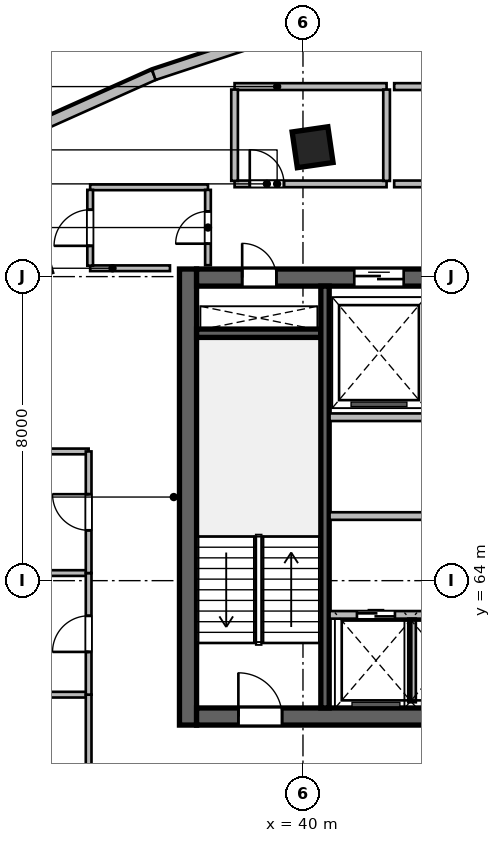
"""IFC4 building model, lengths in metres.
Left out: names, types, materials, properties, quantities, classifications, styles, units other than length and angle.
Written with IfcOpenShell. Run it as: python <this file> out.ifc"""

import sys

from ifc_helpers import new_model, si_unit, direction, frame, frame_2d, origin, origin_2d, place, context, subcontext, project, spatial, rectangle, extrude, source, transform, mapped, element, fill, save


model = new_model("IFC4")
c1 = context("Model", 3, precision=1e-05, world=origin(), true_north=direction((0.0, 1.0)))
c2 = subcontext(c1, "Body", "Model", "MODEL_VIEW")
j1 = project(units=[si_unit("LENGTHUNIT", "METRE"), si_unit("PLANEANGLEUNIT", "RADIAN")], contexts=[c1])
p1 = place(None, origin())
s1 = spatial("IfcSite", under=j1, at=p1, CompositionType="ELEMENT")
p2 = place(p1, origin())
s2 = spatial("IfcBuilding", under=s1, at=p2, CompositionType="ELEMENT")
p3 = place(p2, frame((0.0, 0.0, 243.0)))
s3 = spatial("IfcBuildingStorey", under=s2, at=p3, CompositionType="ELEMENT", Elevation=243.0)
m1 = source(origin(), c2, "Body", "SweptSolid", [
    extrude(rectangle(XDim=12.0, YDim=0.45, at=frame_2d((6.0, 0.0))), origin(), (0.0, 0.0, 1.0), 3.9),
])
p4 = place(p3, frame((36.975, 60.2, 0.0), z_axis=(0.0, 0.0, 1.0), x_axis=(0.0, 1.0, 0.0)))
e1 = element("IfcWall", 1, at=p4, inside=s3, PredefinedType="SHEAR", context=c2, shape_type="MappedRepresentation", body=[
    mapped(m1, transform((0.0, 0.0, 0.0), scale=1.0)),
])
m2 = source(origin(), c2, "Body", "SweptSolid", [
    extrude(rectangle(XDim=21.6, YDim=0.45, at=frame_2d((10.8, 0.0))), origin(), (0.0, 0.0, 1.0), 3.9),
])
p5 = place(p3, frame((37.2, 60.425, 0.0), z_axis=(0.0, 0.0, 1.0), x_axis=(1.0, 0.0, 0.0)))
e2 = element("IfcWall", 2, at=p5, inside=s3, PredefinedType="SHEAR", context=c2, shape_type="MappedRepresentation", body=[
    mapped(m2, transform((0.0, 0.0, 0.0), scale=1.0)),
])
p6 = place(p5, frame((1.1, 0.0, 0.0)))
e3 = element("IfcOpeningElement", 3, at=p6, cuts=e2, PredefinedType="OPENING", context=c2, shape_type="SweptSolid", body=[
    extrude(rectangle(XDim=1.15, YDim=2.15, at=frame_2d((0.575, 1.075))), frame((0.0, 0.235, 0.0), z_axis=(0.0, -1.0, 0.0), x_axis=(1.0, 0.0, 0.0)), (0.0, 0.0, 1.0), 0.47),
])
p7 = place(p5, frame((19.5, 0.0, 0.0)))
e4 = element("IfcOpeningElement", 4, at=p7, cuts=e2, PredefinedType="OPENING", context=c2, shape_type="SweptSolid", body=[
    extrude(rectangle(XDim=0.9, YDim=2.1, at=frame_2d((0.45, 1.05))), frame((0.0, 0.235, 0.0), z_axis=(0.0, -1.0, 0.0), x_axis=(1.0, 0.0, 0.0)), (0.0, 0.0, 1.0), 0.47),
])
p8 = place(p5, frame((12.02, 0.0, 0.0)))
e5 = element("IfcOpeningElement", 5, at=p8, cuts=e2, PredefinedType="OPENING", context=c2, shape_type="SweptSolid", body=[
    extrude(rectangle(XDim=1.6, YDim=2.15, at=frame_2d((0.8, 1.075))), frame((0.0, 0.235, 0.0), z_axis=(0.0, -1.0, 0.0), x_axis=(1.0, 0.0, 0.0)), (0.0, 0.0, 1.0), 0.47),
])
p9 = place(p3, frame((37.2, 71.975, 0.0), z_axis=(0.0, 0.0, 1.0), x_axis=(1.0, 0.0, 0.0)))
e6 = element("IfcWall", 6, at=p9, inside=s3, PredefinedType="SHEAR", context=c2, shape_type="MappedRepresentation", body=[
    mapped(m2, transform((0.0, 0.0, 0.0), scale=1.0)),
])
p10 = place(p9, frame((1.2, 0.0, 0.0)))
e7 = element("IfcOpeningElement", 7, at=p10, cuts=e6, PredefinedType="OPENING", context=c2, shape_type="SweptSolid", body=[
    extrude(rectangle(XDim=0.9, YDim=2.1, at=frame_2d((0.45, 1.05))), frame((0.0, 0.235, 0.0), z_axis=(0.0, -1.0, 0.0), x_axis=(1.0, 0.0, 0.0)), (0.0, 0.0, 1.0), 0.47),
])
p11 = place(p9, frame((14.7, 0.0, 0.0)))
e8 = element("IfcOpeningElement", 8, at=p11, cuts=e6, PredefinedType="OPENING", context=c2, shape_type="SweptSolid", body=[
    extrude(rectangle(XDim=1.2, YDim=2.15, at=frame_2d((0.6, 1.075))), frame((0.0, 0.235, 0.0), z_axis=(0.0, -1.0, 0.0), x_axis=(1.0, 0.0, 0.0)), (0.0, 0.0, 1.0), 0.47),
])
p12 = place(p9, frame((4.15, 0.0, 0.0)))
e9 = element("IfcOpeningElement", 9, at=p12, cuts=e6, PredefinedType="OPENING", context=c2, shape_type="SweptSolid", body=[
    extrude(rectangle(XDim=1.3, YDim=2.15, at=frame_2d((0.65, 1.075))), frame((0.0, 0.235, 0.0), z_axis=(0.0, -1.0, 0.0), x_axis=(1.0, 0.0, 0.0)), (0.0, 0.0, 1.0), 0.47),
])
p13 = place(p9, frame((6.76, 0.0, 0.0)))
e10 = element("IfcOpeningElement", 10, at=p13, cuts=e6, PredefinedType="OPENING", context=c2, shape_type="SweptSolid", body=[
    extrude(rectangle(XDim=0.85, YDim=2.1, at=frame_2d((0.425, 1.05))), frame((0.0, 0.235, 0.0), z_axis=(0.0, -1.0, 0.0), x_axis=(1.0, 0.0, 0.0)), (0.0, 0.0, 1.0), 0.47),
])
p14 = place(p9, frame((8.76, 0.0, 0.0)))
e11 = element("IfcOpeningElement", 11, at=p14, cuts=e6, PredefinedType="OPENING", context=c2, shape_type="SweptSolid", body=[
    extrude(rectangle(XDim=0.85, YDim=2.1, at=frame_2d((0.425, 1.05))), frame((0.0, 0.235, 0.0), z_axis=(0.0, -1.0, 0.0), x_axis=(1.0, 0.0, 0.0)), (0.0, 0.0, 1.0), 0.47),
])
p15 = place(p9, frame((10.725, 0.0, 0.0)))
e12 = element("IfcOpeningElement", 12, at=p15, cuts=e6, PredefinedType="OPENING", context=c2, shape_type="SweptSolid", body=[
    extrude(rectangle(XDim=0.85, YDim=2.1, at=frame_2d((0.425, 1.05))), frame((0.0, 0.235, 0.0), z_axis=(0.0, -1.0, 0.0), x_axis=(1.0, 0.0, 0.0)), (0.0, 0.0, 1.0), 0.47),
])
m3 = source(origin(), c2, "Body", "SweptSolid", [
    extrude(rectangle(XDim=3.27, YDim=0.22, at=frame_2d((1.635, 0.0))), origin(), (0.0, 0.0, 1.0), 3.9),
])
p16 = place(p3, frame((37.2, 70.51, 0.0), z_axis=(0.0, 0.0, 1.0), x_axis=(1.0, 0.0, 0.0)))
e13 = element("IfcWall", 13, at=p16, inside=s3, PredefinedType="SHEAR", context=c2, shape_type="MappedRepresentation", body=[
    mapped(m3, transform((0.0, 0.0, 0.0), scale=1.0)),
])
m4 = source(origin(), c2, "Body", "SweptSolid", [
    extrude(rectangle(XDim=11.1, YDim=0.22, at=frame_2d((5.55, 0.0))), origin(), (0.0, 0.0, 1.0), 3.9),
])
p17 = place(p3, frame((40.58, 60.65, 0.0), z_axis=(0.0, 0.0, 1.0), x_axis=(0.0, 1.0, 0.0)))
e14 = element("IfcWall", 14, at=p17, inside=s3, PredefinedType="SHEAR", context=c2, shape_type="MappedRepresentation", body=[
    mapped(m4, transform((0.0, 0.0, 0.0), scale=1.0)),
])
m5 = source(origin(), c2, "Body", "SweptSolid", [
    extrude(rectangle(XDim=0.95, YDim=0.95, at=origin_2d()), origin(), (0.0, 0.0, 1.0), 3.9),
])
p18 = place(p3, frame((40.253, 75.404, 0.0), z_axis=(0.0, 0.0, 1.0), x_axis=(-0.143492621991, 0.98965138682, 0.0)))
e15 = element("IfcColumn", 15, at=p18, inside=s3, PredefinedType="COLUMN", context=c2, shape_type="MappedRepresentation", body=[
    mapped(m5, transform((0.0, 0.0, 0.0), scale=1.0)),
])
m6 = source(origin(), c2, "Body", "SweptSolid", [
    extrude(rectangle(XDim=3.616, YDim=0.28, at=frame_2d((1.808, 0.0))), origin(), (0.0, 0.0, 1.0), 3.65),
])
p19 = place(p3, frame((32.777, 75.829, 0.0), z_axis=(0.0, 0.0, 1.0), x_axis=(0.912719530576, 0.408586659726, 0.0)))
e16 = element("IfcWall", 16, at=p19, inside=s3, PredefinedType="SOLIDWALL", context=c2, shape_type="MappedRepresentation", body=[
    mapped(m6, transform((0.0, 0.0, 0.0), scale=1.0)),
])
m7 = source(origin(), c2, "Body", "SweptSolid", [
    extrude(rectangle(XDim=3.557, YDim=0.28, at=frame_2d((1.778, 0.0))), origin(), (0.0, 0.0, 1.0), 3.65),
])
p20 = place(p3, frame((36.077, 77.307, 0.0), z_axis=(0.0, 0.0, 1.0), x_axis=(0.949687460385, 0.31319918197, 0.0)))
e17 = element("IfcWall", 17, at=p20, inside=s3, PredefinedType="SOLIDWALL", context=c2, shape_type="MappedRepresentation", body=[
    mapped(m7, transform((0.0, 0.0, 0.0), scale=1.0)),
])
m8 = source(origin(), c2, "Body", "SweptSolid", [
    extrude(rectangle(XDim=8.8, YDim=0.2, at=frame_2d((4.4, 0.0))), origin(), (0.0, 0.0, 1.0), 3.65),
])
p21 = place(p3, frame((40.7, 68.3, 0.0), z_axis=(0.0, 0.0, 1.0), x_axis=(1.0, 0.0, 0.0)))
e18 = element("IfcWall", 18, at=p21, inside=s3, PredefinedType="SOLIDWALL", context=c2, shape_type="MappedRepresentation", body=[
    mapped(m8, transform((0.0, 0.0, 0.0), scale=1.0)),
])
m9 = source(origin(), c2, "Body", "SweptSolid", [
    extrude(rectangle(XDim=8.02, YDim=0.2, at=frame_2d((4.01, 0.0))), origin(), (0.0, 0.0, 1.0), 3.65),
])
p22 = place(p3, frame((40.7, 63.1, 0.0), z_axis=(0.0, 0.0, 1.0), x_axis=(1.0, 0.0, 0.0)))
e19 = element("IfcWall", 19, at=p22, inside=s3, PredefinedType="SOLIDWALL", context=c2, shape_type="MappedRepresentation", body=[
    mapped(m9, transform((0.0, 0.0, 0.0), scale=1.0)),
])
p23 = place(p22, frame((0.72, 0.0, 0.0)))
e20 = element("IfcOpeningElement", 20, at=p23, cuts=e19, PredefinedType="OPENING", context=c2, shape_type="SweptSolid", body=[
    extrude(rectangle(XDim=1.0, YDim=2.15, at=frame_2d((0.5, 1.075))), frame((0.0, 0.11, 0.0), z_axis=(0.0, -1.0, 0.0), x_axis=(1.0, 0.0, 0.0)), (0.0, 0.0, 1.0), 0.22),
])
p24 = place(p22, frame((2.62, 0.0, 0.0)))
e21 = element("IfcOpeningElement", 21, at=p24, cuts=e19, PredefinedType="OPENING", context=c2, shape_type="SweptSolid", body=[
    extrude(rectangle(XDim=1.0, YDim=2.15, at=frame_2d((0.5, 1.075))), frame((0.0, 0.11, 0.0), z_axis=(0.0, -1.0, 0.0), x_axis=(1.0, 0.0, 0.0)), (0.0, 0.0, 1.0), 0.22),
])
p25 = place(p22, frame((4.55, 0.0, 0.0)))
e22 = element("IfcOpeningElement", 22, at=p25, cuts=e19, PredefinedType="OPENING", context=c2, shape_type="SweptSolid", body=[
    extrude(rectangle(XDim=1.0, YDim=2.15, at=frame_2d((0.5, 1.075))), frame((0.0, 0.11, 0.0), z_axis=(0.0, -1.0, 0.0), x_axis=(1.0, 0.0, 0.0)), (0.0, 0.0, 1.0), 0.22),
])
p26 = place(p22, frame((6.55, 0.0, 0.0)))
e23 = element("IfcOpeningElement", 23, at=p26, cuts=e19, PredefinedType="OPENING", context=c2, shape_type="SweptSolid", body=[
    extrude(rectangle(XDim=1.0, YDim=2.15, at=frame_2d((0.5, 1.075))), frame((0.0, 0.11, 0.0), z_axis=(0.0, -1.0, 0.0), x_axis=(1.0, 0.0, 0.0)), (0.0, 0.0, 1.0), 0.22),
])
m10 = source(origin(), c2, "Body", "SweptSolid", [
    extrude(rectangle(XDim=2.2, YDim=0.2, at=frame_2d((1.1, 0.0))), origin(), (0.0, 0.0, 1.0), 3.65),
])
p27 = place(p3, frame((42.87, 60.8, 0.0), z_axis=(0.0, 0.0, 1.0), x_axis=(0.0, 1.0, 0.0)))
e24 = element("IfcWall", 24, at=p27, inside=s3, PredefinedType="SOLIDWALL", context=c2, shape_type="MappedRepresentation", body=[
    mapped(m10, transform((0.0, 0.0, 0.0), scale=1.0)),
])
p28 = place(p3, frame((40.7, 65.7, 0.0), z_axis=(0.0, 0.0, 1.0), x_axis=(1.0, 0.0, 0.0)))
e25 = element("IfcWall", 25, at=p28, inside=s3, PredefinedType="SOLIDWALL", context=c2, shape_type="MappedRepresentation", body=[
    mapped(m8, transform((0.0, 0.0, 0.0), scale=1.0)),
])
p29 = place(p28, frame((3.8, 0.0, 0.0)))
e26 = element("IfcOpeningElement", 26, at=p29, cuts=e25, PredefinedType="OPENING", context=c2, shape_type="SweptSolid", body=[
    extrude(rectangle(XDim=0.95, YDim=2.15, at=frame_2d((0.475, 1.075))), frame((0.0, 0.11, 0.0), z_axis=(0.0, -1.0, 0.0), x_axis=(1.0, 0.0, 0.0)), (0.0, 0.0, 1.0), 0.22),
])
m11 = source(origin(), c2, "Body", "SweptSolid", [
    extrude(rectangle(XDim=2.1, YDim=0.15, at=frame_2d((1.05, 0.0))), origin(), (0.0, 0.0, 1.0), 3.65),
])
p30 = place(p3, frame((34.4, 72.22, 0.0), z_axis=(0.0, 0.0, 1.0), x_axis=(1.0, 0.0, 0.0)))
e27 = element("IfcWall", 27, at=p30, inside=s3, PredefinedType="PARTITIONING", context=c2, shape_type="MappedRepresentation", body=[
    mapped(m11, transform((0.0, 0.0, 0.0), scale=1.0)),
])
m12 = source(origin(), c2, "Body", "SweptSolid", [
    extrude(rectangle(XDim=3.1, YDim=0.15, at=frame_2d((1.55, 0.0))), origin(), (0.0, 0.0, 1.0), 3.081),
])
p31 = place(p3, frame((34.4, 74.35, 0.0), z_axis=(0.0, 0.0, 1.0), x_axis=(1.0, 0.0, 0.0)))
e28 = element("IfcWall", 28, at=p31, inside=s3, PredefinedType="PARTITIONING", context=c2, shape_type="MappedRepresentation", body=[
    mapped(m12, transform((0.0, 0.0, 0.0), scale=1.0)),
])
m13 = source(origin(), c2, "Body", "SweptSolid", [
    extrude(rectangle(XDim=1.995, YDim=0.15, at=frame_2d((0.998, 0.0))), origin(), (0.0, 0.0, 1.0), 3.65),
])
p32 = place(p3, frame((34.4, 72.288, 0.0), z_axis=(0.0, 0.0, 1.0), x_axis=(0.0, 1.0, 0.0)))
e29 = element("IfcWall", 29, at=p32, inside=s3, PredefinedType="PARTITIONING", context=c2, shape_type="MappedRepresentation", body=[
    mapped(m13, transform((0.0, 0.0, 0.0), scale=1.0)),
])
p33 = place(p32, frame((0.522, 0.0, 0.0)))
e30 = element("IfcOpeningElement", 30, at=p33, cuts=e29, PredefinedType="OPENING", context=c2, shape_type="SweptSolid", body=[
    extrude(rectangle(XDim=0.95, YDim=2.1, at=frame_2d((0.475, 1.05))), frame((0.0, 0.085, 0.0), z_axis=(0.0, -1.0, 0.0), x_axis=(1.0, 0.0, 0.0)), (0.0, 0.0, 1.0), 0.17),
])
m14 = source(origin(), c2, "Body", "SweptSolid", [
    extrude(rectangle(XDim=1.982, YDim=0.15, at=frame_2d((0.991, 0.0))), origin(), (0.0, 0.0, 1.0), 3.65),
])
p34 = place(p3, frame((37.5, 72.3, 0.0), z_axis=(0.0, 0.0, 1.0), x_axis=(0.0, 1.0, 0.0)))
e31 = element("IfcWall", 31, at=p34, inside=s3, PredefinedType="PARTITIONING", context=c2, shape_type="MappedRepresentation", body=[
    mapped(m14, transform((0.0, 0.0, 0.0), scale=1.0)),
])
p35 = place(p34, frame((0.566, 0.0, 0.0)))
e32 = element("IfcOpeningElement", 32, at=p35, cuts=e31, PredefinedType="OPENING", context=c2, shape_type="SweptSolid", body=[
    extrude(rectangle(XDim=0.85, YDim=2.1, at=frame_2d((0.425, 1.05))), frame((0.0, 0.085, 0.0), z_axis=(0.0, -1.0, 0.0), x_axis=(1.0, 0.0, 0.0)), (0.0, 0.0, 1.0), 0.17),
])
m15 = source(origin(), c2, "Body", "SweptSolid", [
    extrude(rectangle(XDim=4.0, YDim=0.175, at=frame_2d((2.0, 0.0))), origin(), (0.0, 0.0, 1.0), 3.65),
])
p36 = place(p3, frame((38.2, 74.44, 0.0), z_axis=(0.0, 0.0, 1.0), x_axis=(1.0, 0.0, 0.0)))
e33 = element("IfcWall", 33, at=p36, inside=s3, PredefinedType="PARTITIONING", context=c2, shape_type="MappedRepresentation", body=[
    mapped(m15, transform((0.0, 0.0, 0.0), scale=1.0)),
])
p37 = place(p36, frame((0.4, 0.0, 0.0)))
e34 = element("IfcOpeningElement", 34, at=p37, cuts=e33, PredefinedType="OPENING", context=c2, shape_type="SweptSolid", body=[
    extrude(rectangle(XDim=0.9, YDim=2.08, at=frame_2d((0.45, 1.04))), frame((0.0, 0.098, 0.0), z_axis=(0.0, -1.0, 0.0), x_axis=(1.0, 0.0, 0.0)), (0.0, 0.0, 1.0), 0.195),
])
m16 = source(origin(), c2, "Body", "SweptSolid", [
    extrude(rectangle(XDim=4.0, YDim=0.18, at=frame_2d((2.0, 0.0))), origin(), (0.0, 0.0, 1.0), 3.65),
])
p38 = place(p3, frame((38.2, 77.0, 0.0), z_axis=(0.0, 0.0, 1.0), x_axis=(1.0, 0.0, 0.0)))
e35 = element("IfcWall", 35, at=p38, inside=s3, PredefinedType="PLUMBINGWALL", context=c2, shape_type="MappedRepresentation", body=[
    mapped(m16, transform((0.0, 0.0, 0.0), scale=1.0)),
])
m17 = source(origin(), c2, "Body", "SweptSolid", [
    extrude(rectangle(XDim=2.403, YDim=0.175, at=frame_2d((1.201, 0.0))), origin(), (0.0, 0.0, 1.0), 3.65),
])
for number, where, z_axis, x_axis in (
    (36, (38.2, 74.519, 0.0), (0.0, 0.0, 1.0), (0.0, 1.0, 0.0)),
    (37, (42.2, 74.519, 0.0), (0.0, 0.0, 1.0), (0.0, 1.0, 0.0)),
):
    element("IfcWall", number, at=place(p3, frame(where, z_axis=z_axis, x_axis=x_axis)), inside=s3, PredefinedType="PARTITIONING", context=c2, shape_type="MappedRepresentation", body=[
        mapped(m17, transform((0.0, 0.0, 0.0), scale=1.0)),
    ])
p39 = place(p3, frame((42.4, 74.44, 0.0), z_axis=(0.0, 0.0, 1.0), x_axis=(1.0, 0.0, 0.0)))
e38 = element("IfcWall", 38, at=p39, inside=s3, PredefinedType="PARTITIONING", context=c2, shape_type="MappedRepresentation", body=[
    mapped(m15, transform((0.0, 0.0, 0.0), scale=1.0)),
])
p40 = place(p39, frame((1.55, 0.0, 0.0)))
e39 = element("IfcOpeningElement", 39, at=p40, cuts=e38, PredefinedType="OPENING", context=c2, shape_type="SweptSolid", body=[
    extrude(rectangle(XDim=0.9, YDim=2.08, at=frame_2d((0.45, 1.04))), frame((0.0, 0.098, 0.0), z_axis=(0.0, -1.0, 0.0), x_axis=(1.0, 0.0, 0.0)), (0.0, 0.0, 1.0), 0.195),
])
p41 = place(p3, frame((42.4, 77.0, 0.0), z_axis=(0.0, 0.0, 1.0), x_axis=(1.0, 0.0, 0.0)))
e40 = element("IfcWall", 40, at=p41, inside=s3, PredefinedType="PLUMBINGWALL", context=c2, shape_type="MappedRepresentation", body=[
    mapped(m16, transform((0.0, 0.0, 0.0), scale=1.0)),
])
m18 = source(origin(), c2, "Body", "SweptSolid", [
    extrude(rectangle(XDim=17.879, YDim=0.15, at=frame_2d((8.939, 0.0))), origin(), (0.0, 0.0, 1.0), 3.65),
])
p42 = place(p3, frame((16.481, 61.0, 0.0), z_axis=(0.0, 0.0, 1.0), x_axis=(1.0, 0.0, 0.0)))
e41 = element("IfcWall", 41, at=p42, inside=s3, PredefinedType="PARTITIONING", context=c2, shape_type="MappedRepresentation", body=[
    mapped(m18, transform((0.0, 0.0, 0.0), scale=1.0)),
])
m19 = source(origin(), c2, "Body", "SweptSolid", [
    extrude(rectangle(XDim=3.04, YDim=0.15, at=frame_2d((1.52, 0.0))), origin(), (0.0, 0.0, 1.0), 3.65),
])
p43 = place(p3, frame((34.36, 57.96, 0.0), z_axis=(0.0, 0.0, 1.0), x_axis=(0.0, 1.0, 0.0)))
e42 = element("IfcWall", 42, at=p43, inside=s3, PredefinedType="PARTITIONING", context=c2, shape_type="MappedRepresentation", body=[
    mapped(m19, transform((0.0, 0.0, 0.0), scale=1.0)),
])
m20 = source(origin(), c2, "Body", "SweptSolid", [
    extrude(rectangle(XDim=15.501, YDim=0.15, at=frame_2d((7.751, 0.0))), origin(), (0.0, 0.0, 1.0), 3.65),
])
p44 = place(p3, frame((18.859, 64.2, 0.0), z_axis=(0.0, 0.0, 1.0), x_axis=(1.0, 0.0, 0.0)))
e43 = element("IfcWall", 43, at=p44, inside=s3, PredefinedType="PARTITIONING", context=c2, shape_type="MappedRepresentation", body=[
    mapped(m20, transform((0.0, 0.0, 0.0), scale=1.0)),
])
m21 = source(origin(), c2, "Body", "SweptSolid", [
    extrude(rectangle(XDim=3.2, YDim=0.15, at=frame_2d((1.6, 0.0))), origin(), (0.0, 0.0, 1.0), 3.65),
])
p45 = place(p3, frame((34.36, 61.0, 0.0), z_axis=(0.0, 0.0, 1.0), x_axis=(0.0, 1.0, 0.0)))
e44 = element("IfcWall", 44, at=p45, inside=s3, PredefinedType="PARTITIONING", context=c2, shape_type="MappedRepresentation", body=[
    mapped(m21, transform((0.0, 0.0, 0.0), scale=1.0)),
])
p46 = place(p45, frame((1.125, 0.0, 0.0)))
e45 = element("IfcOpeningElement", 45, at=p46, cuts=e44, PredefinedType="OPENING", context=c2, shape_type="SweptSolid", body=[
    extrude(rectangle(XDim=0.95, YDim=2.1, at=frame_2d((0.475, 1.05))), frame((0.0, 0.085, 0.0), z_axis=(0.0, -1.0, 0.0), x_axis=(1.0, 0.0, 0.0)), (0.0, 0.0, 1.0), 0.17),
])
m22 = source(origin(), c2, "Body", "SweptSolid", [
    extrude(rectangle(XDim=12.688, YDim=0.15, at=frame_2d((6.344, 0.0))), origin(), (0.0, 0.0, 1.0), 3.65),
])
p47 = place(p3, frame((21.672, 67.4, 0.0), z_axis=(0.0, 0.0, 1.0), x_axis=(1.0, 0.0, 0.0)))
e46 = element("IfcWall", 46, at=p47, inside=s3, PredefinedType="PARTITIONING", context=c2, shape_type="MappedRepresentation", body=[
    mapped(m22, transform((0.0, 0.0, 0.0), scale=1.0)),
])
p48 = place(p3, frame((34.36, 64.2, 0.0), z_axis=(0.0, 0.0, 1.0), x_axis=(0.0, 1.0, 0.0)))
e47 = element("IfcWall", 47, at=p48, inside=s3, PredefinedType="PARTITIONING", context=c2, shape_type="MappedRepresentation", body=[
    mapped(m21, transform((0.0, 0.0, 0.0), scale=1.0)),
])
p49 = place(p48, frame((1.125, 0.0, 0.0)))
e48 = element("IfcOpeningElement", 48, at=p49, cuts=e47, PredefinedType="OPENING", context=c2, shape_type="SweptSolid", body=[
    extrude(rectangle(XDim=0.95, YDim=2.1, at=frame_2d((0.475, 1.05))), frame((0.0, 0.085, 0.0), z_axis=(0.0, -1.0, 0.0), x_axis=(1.0, 0.0, 0.0)), (0.0, 0.0, 1.0), 0.17),
])
m23 = source(origin(), c2, "Body", "SweptSolid", [
    extrude(rectangle(XDim=1.15, YDim=2.15, at=frame_2d((0.575, 1.075))), frame((0.0, 0.025, 0.0), z_axis=(0.0, -1.0, 0.0), x_axis=(1.0, 0.0, 0.0)), (0.0, 0.0, 1.0), 0.05),
])
p50 = place(p6, origin())
e49 = element("IfcDoor", 49, at=p50, inside=s3, OperationType="SINGLE_SWING_LEFT", PredefinedType="DOOR", context=c2, shape_type="MappedRepresentation", body=[
    mapped(m23, transform((0.0, 0.0, 0.0), scale=1.0)),
])
fill(e3, e49)
m24 = source(origin(), c2, "Body", "SweptSolid", [
    extrude(rectangle(XDim=0.9, YDim=2.1, at=frame_2d((0.45, 1.05))), frame((0.0, 0.025, 0.0), z_axis=(0.0, -1.0, 0.0), x_axis=(1.0, 0.0, 0.0)), (0.0, 0.0, 1.0), 0.05),
])
p51 = place(p10, origin())
e50 = element("IfcDoor", 50, at=p51, inside=s3, OperationType="SINGLE_SWING_LEFT", PredefinedType="DOOR", context=c2, shape_type="MappedRepresentation", body=[
    mapped(m24, transform((0.0, 0.0, 0.0), scale=1.0)),
])
fill(e7, e50)
m25 = source(origin(), c2, "Body", "SweptSolid", [
    extrude(rectangle(XDim=1.3, YDim=2.15, at=frame_2d((0.65, 1.075))), frame((0.0, 0.025, 0.0), z_axis=(0.0, -1.0, 0.0), x_axis=(1.0, 0.0, 0.0)), (0.0, 0.0, 1.0), 0.05),
])
p52 = place(p12, origin())
e51 = element("IfcDoor", 51, at=p52, inside=s3, OperationType="DOUBLE_DOOR_SLIDING", PredefinedType="DOOR", context=c2, shape_type="MappedRepresentation", body=[
    mapped(m25, transform((0.0, 0.0, 0.0), scale=1.0)),
])
fill(e9, e51)
m26 = source(origin(), c2, "Body", "SweptSolid", [
    extrude(rectangle(XDim=1.0, YDim=2.15, at=frame_2d((0.5, 1.075))), frame((0.0, 0.025, 0.0), z_axis=(0.0, -1.0, 0.0), x_axis=(1.0, 0.0, 0.0)), (0.0, 0.0, 1.0), 0.05),
])
p53 = place(p23, origin())
e52 = element("IfcDoor", 52, at=p53, inside=s3, OperationType="DOUBLE_DOOR_SLIDING", PredefinedType="DOOR", context=c2, shape_type="MappedRepresentation", body=[
    mapped(m26, transform((0.0, 0.0, 0.0), scale=1.0)),
])
fill(e20, e52)
m27 = source(origin(), c2, "Body", "SweptSolid", [
    extrude(rectangle(XDim=0.85, YDim=2.1, at=frame_2d((0.425, 1.05))), frame((0.0, 0.025, 0.0), z_axis=(0.0, -1.0, 0.0), x_axis=(1.0, 0.0, 0.0)), (0.0, 0.0, 1.0), 0.05),
])
p54 = place(p35, origin())
e53 = element("IfcDoor", 53, at=p54, inside=s3, OperationType="SINGLE_SWING_LEFT", PredefinedType="DOOR", context=c2, shape_type="MappedRepresentation", body=[
    mapped(m27, transform((0.0, 0.0, 0.0), scale=1.0)),
])
fill(e32, e53)
m28 = source(origin(), c2, "Body", "SweptSolid", [
    extrude(rectangle(XDim=0.9, YDim=2.08, at=frame_2d((0.45, 1.04))), frame((0.0, 0.025, 0.0), z_axis=(0.0, -1.0, 0.0), x_axis=(1.0, 0.0, 0.0)), (0.0, 0.0, 1.0), 0.05),
])
p55 = place(p37, origin())
e54 = element("IfcDoor", 54, at=p55, inside=s3, OperationType="SINGLE_SWING_LEFT", PredefinedType="DOOR", context=c2, shape_type="MappedRepresentation", body=[
    mapped(m28, transform((0.0, 0.0, 0.0), scale=1.0)),
])
fill(e34, e54)
m29 = source(origin(), c2, "Body", "SweptSolid", [
    extrude(rectangle(XDim=0.95, YDim=2.1, at=frame_2d((0.475, 1.05))), frame((0.0, 0.025, 0.0), z_axis=(0.0, -1.0, 0.0), x_axis=(1.0, 0.0, 0.0)), (0.0, 0.0, 1.0), 0.05),
])
p56 = place(p46, origin())
e55 = element("IfcDoor", 55, at=p56, inside=s3, OperationType="SINGLE_SWING_LEFT", PredefinedType="DOOR", context=c2, shape_type="MappedRepresentation", body=[
    mapped(m29, transform((0.0, 0.0, 0.0), scale=1.0)),
])
fill(e45, e55)
p57 = place(p49, origin())
e56 = element("IfcDoor", 56, at=p57, inside=s3, OperationType="SINGLE_SWING_RIGHT", PredefinedType="DOOR", context=c2, shape_type="MappedRepresentation", body=[
    mapped(m29, transform((0.0, 0.0, 0.0), scale=1.0)),
])
fill(e48, e56)
p58 = place(p33, origin())
e57 = element("IfcDoor", 57, at=p58, inside=s3, OperationType="SINGLE_SWING_LEFT", PredefinedType="DOOR", context=c2, shape_type="MappedRepresentation", body=[
    mapped(m29, transform((0.0, 0.0, 0.0), scale=1.0)),
])
fill(e30, e57)
save(model, sys.argv[1])
